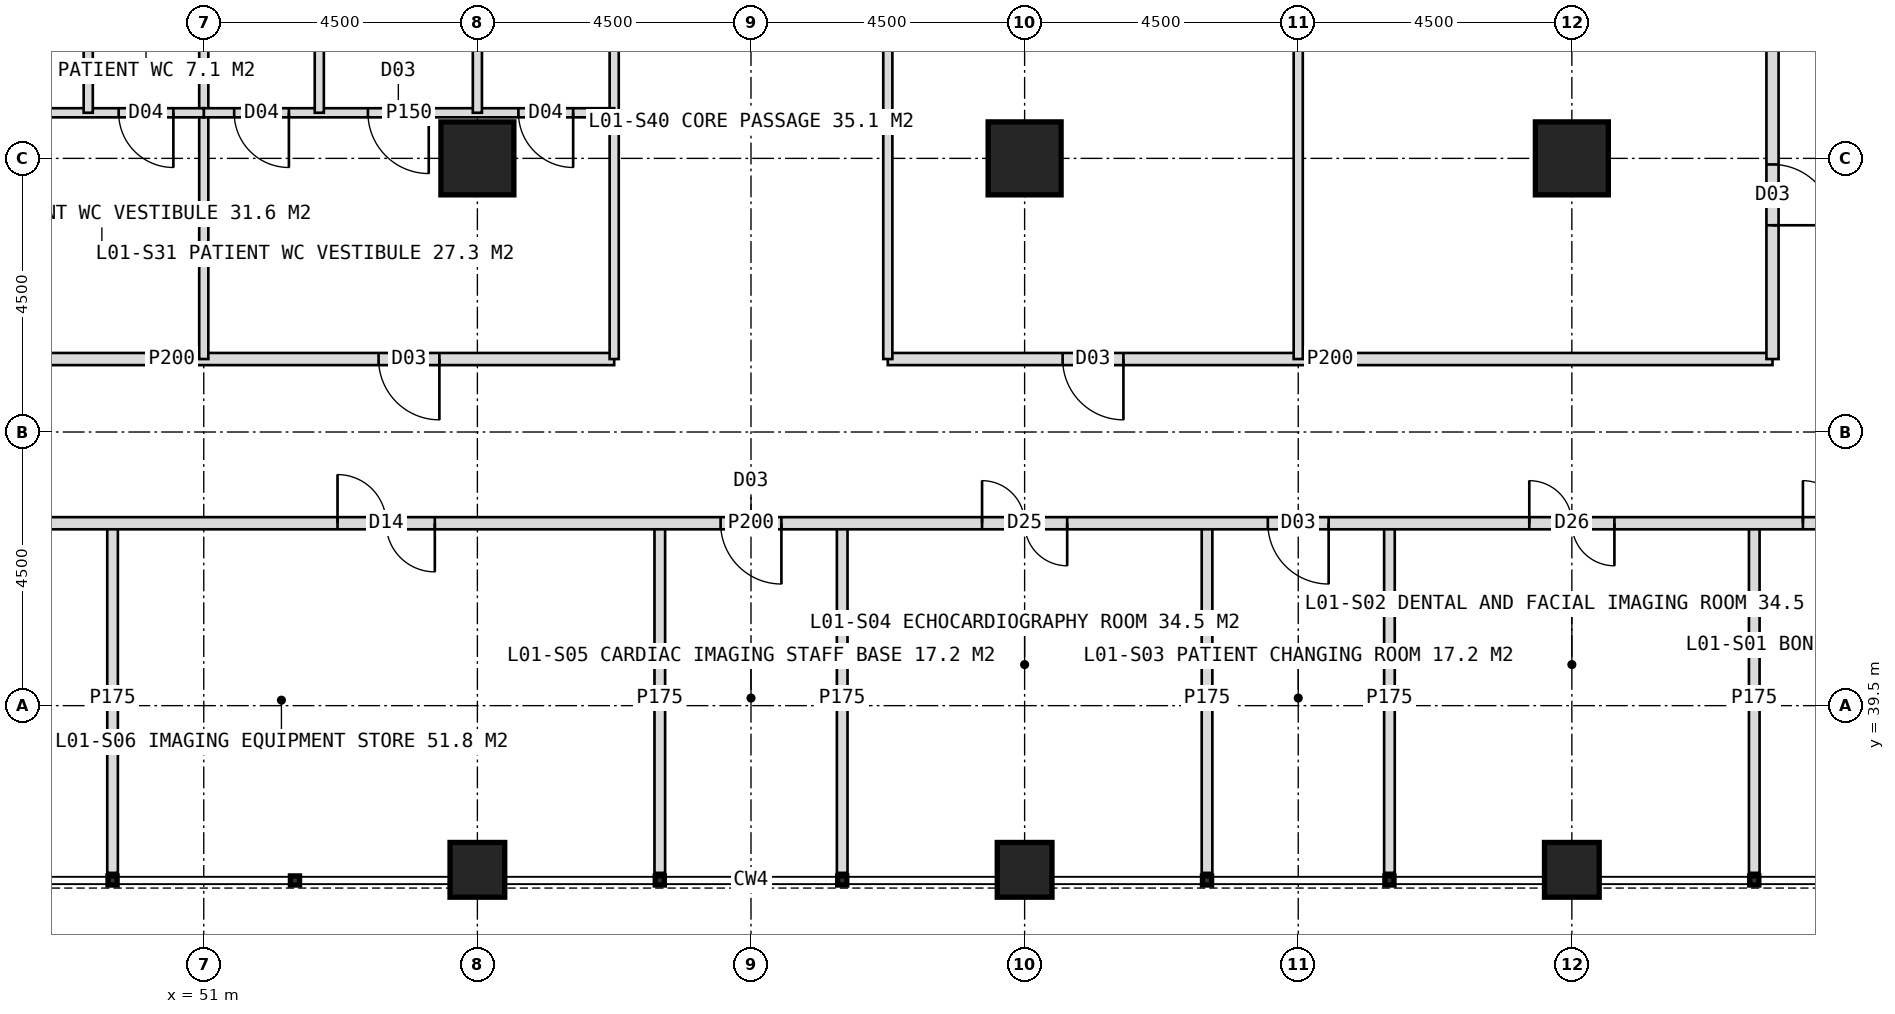
"""IFC4 building model, lengths in metres.
Left out: names, types, materials, properties, quantities, classifications, styles, units other than length and angle.
Written with IfcOpenShell. Run it as: python <this file> out.ifc"""

import sys

from ifc_helpers import new_model, si_unit, direction, frame, frame_2d, origin, origin_2d, place, context, subcontext, project, spatial, rectangle, hollow_rectangle, extrude, element, fill, save


model = new_model("IFC4")
c1 = context("Model", 3, precision=1e-05, world=origin(), true_north=direction((0.0, 1.0)))
c2 = subcontext(c1, "Body", "Model", "MODEL_VIEW")
j1 = project(units=[si_unit("LENGTHUNIT", "METRE"), si_unit("PLANEANGLEUNIT", "RADIAN")], contexts=[c1])
p1 = place(None, origin())
s1 = spatial("IfcSite", under=j1, at=p1, CompositionType="ELEMENT")
p2 = place(p1, origin())
s2 = spatial("IfcBuilding", under=s1, at=p2, CompositionType="ELEMENT")
p3 = place(p2, frame((0.0, 0.0, 6.0)))
s3 = spatial("IfcBuildingStorey", under=s2, at=p3, CompositionType="ELEMENT", Elevation=6.0)
for number, where, z_axis, x_axis in (
    (1, (73.5, 48.5, 0.0), (0.0, 0.0, 1.0), (1.0, 0.0, 0.0)),
    (2, (55.5, 48.5, 0.0), (0.0, 0.0, 1.0), (1.0, 0.0, 0.0)),
    (3, (64.5, 48.5, 0.0), (0.0, 0.0, 1.0), (1.0, 0.0, 0.0)),
):
    element("IfcColumn", number, at=place(p3, frame(where, z_axis=z_axis, x_axis=x_axis)), inside=s3, PredefinedType="COLUMN", context=c2, shape_type="SweptSolid", body=[
        extrude(hollow_rectangle(XDim=1.2, YDim=1.2, WallThickness=0.1, at=origin_2d()), origin(), (0.0, 0.0, 1.0), 5.0),
    ])
for number, where, z_axis, x_axis in (
    (4, (55.5, 36.8, 0.0), (0.0, 0.0, 1.0), (1.0, 0.0, 0.0)),
    (5, (64.5, 36.8, 0.0), (0.0, 0.0, 1.0), (1.0, 0.0, 0.0)),
    (6, (73.5, 36.8, 0.0), (0.0, 0.0, 1.0), (1.0, 0.0, 0.0)),
):
    element("IfcColumn", number, at=place(p3, frame(where, z_axis=z_axis, x_axis=x_axis)), inside=s3, PredefinedType="COLUMN", context=c2, shape_type="SweptSolid", body=[
        extrude(hollow_rectangle(XDim=0.9, YDim=0.9, WallThickness=0.08, at=origin_2d()), origin(), (0.0, 0.0, 1.0), 5.0),
    ])
for number, where, z_axis, x_axis in (
    (7, (76.5, 42.5, 0.0), (0.0, 0.0, 1.0), (0.0, -1.0, 0.0)),
    (8, (70.5, 42.5, 0.0), (0.0, 0.0, 1.0), (0.0, -1.0, 0.0)),
    (9, (67.5, 42.5, 0.0), (0.0, 0.0, 1.0), (0.0, -1.0, 0.0)),
    (10, (61.5, 42.5, 0.0), (0.0, 0.0, 1.0), (0.0, -1.0, 0.0)),
    (11, (58.5, 42.5, 0.0), (0.0, 0.0, 1.0), (0.0, -1.0, 0.0)),
    (12, (49.5, 42.5, 0.0), (0.0, 0.0, 1.0), (0.0, -1.0, 0.0)),
):
    element("IfcWall", number, at=place(p3, frame(where, z_axis=z_axis, x_axis=x_axis)), inside=s3, PredefinedType="PARTITIONING", context=c2, shape_type="SweptSolid", body=[
        extrude(rectangle(XDim=5.75, YDim=0.175, at=frame_2d((2.875, 0.0))), origin(), (0.0, 0.0, 1.0), 4.7),
    ])
p4 = place(p3, frame((79.5, 42.5, 0.0), z_axis=(0.0, 0.0, 1.0), x_axis=(-1.0, 0.0, 0.0)))
e13 = element("IfcWall", 13, at=p4, inside=s3, PredefinedType="PARTITIONING", context=c2, shape_type="SweptSolid", body=[
    extrude(rectangle(XDim=39.0, YDim=0.2, at=frame_2d((19.5, 0.0))), origin(), (0.0, 0.0, 1.0), 4.7),
])
p5 = place(p4, frame((0.8, 0.0, 0.0)))
e14 = element("IfcOpeningElement", 14, at=p5, cuts=e13, PredefinedType="OPENING", context=c2, shape_type="SweptSolid", body=[
    extrude(rectangle(XDim=1.4, YDim=2.2, at=frame_2d((0.7, 1.1))), frame((0.0, 0.11, 0.0), z_axis=(0.0, -1.0, 0.0), x_axis=(1.0, 0.0, 0.0)), (0.0, 0.0, 1.0), 0.22),
])
p6 = place(p4, frame((5.3, 0.0, 0.0)))
e15 = element("IfcOpeningElement", 15, at=p6, cuts=e13, PredefinedType="OPENING", context=c2, shape_type="SweptSolid", body=[
    extrude(rectangle(XDim=1.4, YDim=2.2, at=frame_2d((0.7, 1.1))), frame((0.0, 0.11, 0.0), z_axis=(0.0, -1.0, 0.0), x_axis=(1.0, 0.0, 0.0)), (0.0, 0.0, 1.0), 0.22),
])
p7 = place(p4, frame((10.0, 0.0, 0.0)))
e16 = element("IfcOpeningElement", 16, at=p7, cuts=e13, PredefinedType="OPENING", context=c2, shape_type="SweptSolid", body=[
    extrude(rectangle(XDim=1.0, YDim=2.1, at=frame_2d((0.5, 1.05))), frame((0.0, 0.11, 0.0), z_axis=(0.0, -1.0, 0.0), x_axis=(1.0, 0.0, 0.0)), (0.0, 0.0, 1.0), 0.22),
])
p8 = place(p4, frame((14.3, 0.0, 0.0)))
e17 = element("IfcOpeningElement", 17, at=p8, cuts=e13, PredefinedType="OPENING", context=c2, shape_type="SweptSolid", body=[
    extrude(rectangle(XDim=1.4, YDim=2.2, at=frame_2d((0.7, 1.1))), frame((0.0, 0.11, 0.0), z_axis=(0.0, -1.0, 0.0), x_axis=(1.0, 0.0, 0.0)), (0.0, 0.0, 1.0), 0.22),
])
p9 = place(p4, frame((19.0, 0.0, 0.0)))
e18 = element("IfcOpeningElement", 18, at=p9, cuts=e13, PredefinedType="OPENING", context=c2, shape_type="SweptSolid", body=[
    extrude(rectangle(XDim=1.0, YDim=2.1, at=frame_2d((0.5, 1.05))), frame((0.0, 0.11, 0.0), z_axis=(0.0, -1.0, 0.0), x_axis=(1.0, 0.0, 0.0)), (0.0, 0.0, 1.0), 0.22),
])
p10 = place(p4, frame((24.7, 0.0, 0.0)))
e19 = element("IfcOpeningElement", 19, at=p10, cuts=e13, PredefinedType="OPENING", context=c2, shape_type="SweptSolid", body=[
    extrude(rectangle(XDim=1.6, YDim=2.2, at=frame_2d((0.8, 1.1))), frame((0.0, 0.11, 0.0), z_axis=(0.0, -1.0, 0.0), x_axis=(1.0, 0.0, 0.0)), (0.0, 0.0, 1.0), 0.22),
])
p11 = place(p4, frame((33.7, 0.0, 0.0)))
e20 = element("IfcOpeningElement", 20, at=p11, cuts=e13, PredefinedType="OPENING", context=c2, shape_type="SweptSolid", body=[
    extrude(rectangle(XDim=1.6, YDim=2.2, at=frame_2d((0.8, 1.1))), frame((0.0, 0.11, 0.0), z_axis=(0.0, -1.0, 0.0), x_axis=(1.0, 0.0, 0.0)), (0.0, 0.0, 1.0), 0.22),
])
p12 = place(p3, frame((76.8, 45.2, 0.0), z_axis=(0.0, 0.0, 1.0), x_axis=(-1.0, 0.0, 0.0)))
e21 = element("IfcWall", 21, at=p12, inside=s3, PredefinedType="PARTITIONING", context=c2, shape_type="SweptSolid", body=[
    extrude(rectangle(XDim=14.55, YDim=0.2, at=frame_2d((7.275, 0.0))), origin(), (0.0, 0.0, 1.0), 4.7),
])
p13 = place(p12, frame((10.675, 0.0, 0.0)))
e22 = element("IfcOpeningElement", 22, at=p13, cuts=e21, PredefinedType="OPENING", context=c2, shape_type="SweptSolid", body=[
    extrude(rectangle(XDim=1.0, YDim=2.1, at=frame_2d((0.5, 1.05))), frame((0.0, 0.11, 0.0), z_axis=(0.0, -1.0, 0.0), x_axis=(1.0, 0.0, 0.0)), (0.0, 0.0, 1.0), 0.22),
])
p14 = place(p3, frame((57.75, 45.2, 0.0), z_axis=(0.0, 0.0, 1.0), x_axis=(-1.0, 0.0, 0.0)))
e23 = element("IfcWall", 23, at=p14, inside=s3, PredefinedType="PARTITIONING", context=c2, shape_type="SweptSolid", body=[
    extrude(rectangle(XDim=14.55, YDim=0.2, at=frame_2d((7.275, 0.0))), origin(), (0.0, 0.0, 1.0), 4.7),
])
p15 = place(p14, frame((2.875, 0.0, 0.0)))
e24 = element("IfcOpeningElement", 24, at=p15, cuts=e23, PredefinedType="OPENING", context=c2, shape_type="SweptSolid", body=[
    extrude(rectangle(XDim=1.0, YDim=2.1, at=frame_2d((0.5, 1.05))), frame((0.0, 0.11, 0.0), z_axis=(0.0, -1.0, 0.0), x_axis=(1.0, 0.0, 0.0)), (0.0, 0.0, 1.0), 0.22),
])
p16 = place(p14, frame((10.15, 0.0, 0.0)))
e25 = element("IfcOpeningElement", 25, at=p16, cuts=e23, PredefinedType="OPENING", context=c2, shape_type="SweptSolid", body=[
    extrude(rectangle(XDim=1.0, YDim=2.1, at=frame_2d((0.5, 1.05))), frame((0.0, 0.11, 0.0), z_axis=(0.0, -1.0, 0.0), x_axis=(1.0, 0.0, 0.0)), (0.0, 0.0, 1.0), 0.22),
])
for number, where, z_axis, x_axis in (
    (26, (69.0, 53.0, 0.0), (0.0, 0.0, 1.0), (0.0, -1.0, 0.0)),
    (27, (62.25, 53.0, 0.0), (0.0, 0.0, 1.0), (0.0, -1.0, 0.0)),
    (28, (57.75, 53.0, 0.0), (0.0, 0.0, 1.0), (0.0, -1.0, 0.0)),
    (29, (51.0, 53.0, 0.0), (0.0, 0.0, 1.0), (0.0, -1.0, 0.0)),
):
    element("IfcWall", number, at=place(p3, frame(where, z_axis=z_axis, x_axis=x_axis)), inside=s3, PredefinedType="PARTITIONING", context=c2, shape_type="SweptSolid", body=[
        extrude(rectangle(XDim=7.8, YDim=0.15, at=frame_2d((3.9, 0.0))), origin(), (0.0, 0.0, 1.0), 4.7),
    ])
p17 = place(p3, frame((57.75, 49.25, 0.0), z_axis=(0.0, 0.0, 1.0), x_axis=(-1.0, 0.0, 0.0)))
e30 = element("IfcWall", 30, at=p17, inside=s3, PredefinedType="PARTITIONING", context=c2, shape_type="SweptSolid", body=[
    extrude(rectangle(XDim=6.75, YDim=0.15, at=frame_2d((3.375, 0.0))), origin(), (0.0, 0.0, 1.0), 4.7),
])
p18 = place(p17, frame((0.675, 0.0, 0.0)))
e31 = element("IfcOpeningElement", 31, at=p18, cuts=e30, PredefinedType="OPENING", context=c2, shape_type="SweptSolid", body=[
    extrude(rectangle(XDim=0.9, YDim=2.1, at=frame_2d((0.45, 1.05))), frame((0.0, 0.085, 0.0), z_axis=(0.0, -1.0, 0.0), x_axis=(1.0, 0.0, 0.0)), (0.0, 0.0, 1.0), 0.17),
])
p19 = place(p17, frame((3.05, 0.0, 0.0)))
e32 = element("IfcOpeningElement", 32, at=p19, cuts=e30, PredefinedType="OPENING", context=c2, shape_type="SweptSolid", body=[
    extrude(rectangle(XDim=1.0, YDim=2.1, at=frame_2d((0.5, 1.05))), frame((0.0, 0.085, 0.0), z_axis=(0.0, -1.0, 0.0), x_axis=(1.0, 0.0, 0.0)), (0.0, 0.0, 1.0), 0.17),
])
p20 = place(p17, frame((5.35, 0.0, 0.0)))
e33 = element("IfcOpeningElement", 33, at=p20, cuts=e30, PredefinedType="OPENING", context=c2, shape_type="SweptSolid", body=[
    extrude(rectangle(XDim=0.9, YDim=2.1, at=frame_2d((0.45, 1.05))), frame((0.0, 0.085, 0.0), z_axis=(0.0, -1.0, 0.0), x_axis=(1.0, 0.0, 0.0)), (0.0, 0.0, 1.0), 0.17),
])
p21 = place(p3, frame((55.5, 53.0, 0.0), z_axis=(0.0, 0.0, 1.0), x_axis=(0.0, -1.0, 0.0)))
e34 = element("IfcWall", 34, at=p21, inside=s3, PredefinedType="PARTITIONING", context=c2, shape_type="SweptSolid", body=[
    extrude(rectangle(XDim=3.75, YDim=0.15, at=frame_2d((1.875, 0.0))), origin(), (0.0, 0.0, 1.0), 3.8),
])
p22 = place(p3, frame((52.9, 53.0, 0.0), z_axis=(0.0, 0.0, 1.0), x_axis=(0.0, -1.0, 0.0)))
e35 = element("IfcWall", 35, at=p22, inside=s3, PredefinedType="PARTITIONING", context=c2, shape_type="SweptSolid", body=[
    extrude(rectangle(XDim=3.75, YDim=0.15, at=frame_2d((1.875, 0.0))), origin(), (0.0, 0.0, 1.0), 4.7),
])
p23 = place(p3, frame((51.0, 49.25, 0.0), z_axis=(0.0, 0.0, 1.0), x_axis=(-1.0, 0.0, 0.0)))
e36 = element("IfcWall", 36, at=p23, inside=s3, PredefinedType="PARTITIONING", context=c2, shape_type="SweptSolid", body=[
    extrude(rectangle(XDim=7.8, YDim=0.15, at=frame_2d((3.9, 0.0))), origin(), (0.0, 0.0, 1.0), 4.7),
])
p24 = place(p23, frame((0.5, 0.0, 0.0)))
e37 = element("IfcOpeningElement", 37, at=p24, cuts=e36, PredefinedType="OPENING", context=c2, shape_type="SweptSolid", body=[
    extrude(rectangle(XDim=0.9, YDim=2.1, at=frame_2d((0.45, 1.05))), frame((0.0, 0.085, 0.0), z_axis=(0.0, -1.0, 0.0), x_axis=(1.0, 0.0, 0.0)), (0.0, 0.0, 1.0), 0.17),
])
p25 = place(p23, frame((2.7, 0.0, 0.0)))
e38 = element("IfcOpeningElement", 38, at=p25, cuts=e36, PredefinedType="OPENING", context=c2, shape_type="SweptSolid", body=[
    extrude(rectangle(XDim=1.0, YDim=2.1, at=frame_2d((0.5, 1.05))), frame((0.0, 0.085, 0.0), z_axis=(0.0, -1.0, 0.0), x_axis=(1.0, 0.0, 0.0)), (0.0, 0.0, 1.0), 0.17),
])
p26 = place(p23, frame((5.7, 0.0, 0.0)))
e39 = element("IfcOpeningElement", 39, at=p26, cuts=e36, PredefinedType="OPENING", context=c2, shape_type="SweptSolid", body=[
    extrude(rectangle(XDim=0.9, YDim=2.1, at=frame_2d((0.45, 1.05))), frame((0.0, 0.085, 0.0), z_axis=(0.0, -1.0, 0.0), x_axis=(1.0, 0.0, 0.0)), (0.0, 0.0, 1.0), 0.17),
])
p27 = place(p3, frame((49.1, 53.0, 0.0), z_axis=(0.0, 0.0, 1.0), x_axis=(0.0, -1.0, 0.0)))
e40 = element("IfcWall", 40, at=p27, inside=s3, PredefinedType="PARTITIONING", context=c2, shape_type="SweptSolid", body=[
    extrude(rectangle(XDim=3.75, YDim=0.15, at=frame_2d((1.875, 0.0))), origin(), (0.0, 0.0, 1.0), 4.7),
])
p28 = place(p3, frame((76.8, 62.0, 0.0), z_axis=(0.0, 0.0, 1.0), x_axis=(0.0, -1.0, 0.0)))
e41 = element("IfcWall", 41, at=p28, inside=s3, PredefinedType="PARTITIONING", context=c2, shape_type="SweptSolid", body=[
    extrude(rectangle(XDim=16.8, YDim=0.2, at=frame_2d((8.4, 0.0))), origin(), (0.0, 0.0, 1.0), 4.7),
])
p29 = place(p28, frame((4.0, 0.0, 0.0)))
e42 = element("IfcOpeningElement", 42, at=p29, cuts=e41, PredefinedType="OPENING", context=c2, shape_type="SweptSolid", body=[
    extrude(rectangle(XDim=1.0, YDim=2.1, at=frame_2d((0.5, 1.05))), frame((0.0, 0.11, 0.0), z_axis=(0.0, -1.0, 0.0), x_axis=(1.0, 0.0, 0.0)), (0.0, 0.0, 1.0), 0.22),
])
p30 = place(p28, frame((9.75, 0.0, 0.0)))
e43 = element("IfcOpeningElement", 43, at=p30, cuts=e41, PredefinedType="OPENING", context=c2, shape_type="SweptSolid", body=[
    extrude(rectangle(XDim=0.9, YDim=2.1, at=frame_2d((0.45, 1.05))), frame((0.0, 0.11, 0.0), z_axis=(0.0, -1.0, 0.0), x_axis=(1.0, 0.0, 0.0)), (0.0, 0.0, 1.0), 0.22),
])
p31 = place(p28, frame((13.6, 0.0, 0.0)))
e44 = element("IfcOpeningElement", 44, at=p31, cuts=e41, PredefinedType="OPENING", context=c2, shape_type="SweptSolid", body=[
    extrude(rectangle(XDim=1.0, YDim=2.1, at=frame_2d((0.5, 1.05))), frame((0.0, 0.11, 0.0), z_axis=(0.0, -1.0, 0.0), x_axis=(1.0, 0.0, 0.0)), (0.0, 0.0, 1.0), 0.22),
])
p32 = place(p13, origin())
e45 = element("IfcDoor", 45, at=p32, inside=s3, OperationType="SINGLE_SWING_LEFT", PredefinedType="DOOR", context=c2, shape_type="SweptSolid", body=[
    extrude(rectangle(XDim=1.0, YDim=2.1, at=frame_2d((0.5, 1.05))), frame((0.0, 0.025, 0.0), z_axis=(0.0, -1.0, 0.0), x_axis=(1.0, 0.0, 0.0)), (0.0, 0.0, 1.0), 0.05),
])
fill(e22, e45)
p33 = place(p15, origin())
e46 = element("IfcDoor", 46, at=p33, inside=s3, OperationType="SINGLE_SWING_LEFT", PredefinedType="DOOR", context=c2, shape_type="SweptSolid", body=[
    extrude(rectangle(XDim=1.0, YDim=2.1, at=frame_2d((0.5, 1.05))), frame((0.0, 0.025, 0.0), z_axis=(0.0, -1.0, 0.0), x_axis=(1.0, 0.0, 0.0)), (0.0, 0.0, 1.0), 0.05),
])
fill(e24, e46)
p34 = place(p5, origin())
e47 = element("IfcDoor", 47, at=p34, inside=s3, OperationType="DOUBLE_DOOR_SINGLE_SWING", PredefinedType="DOOR", context=c2, shape_type="SweptSolid", body=[
    extrude(rectangle(XDim=1.4, YDim=2.2, at=frame_2d((0.7, 1.1))), frame((0.0, 0.025, 0.0), z_axis=(0.0, -1.0, 0.0), x_axis=(1.0, 0.0, 0.0)), (0.0, 0.0, 1.0), 0.05),
])
fill(e14, e47)
p35 = place(p6, origin())
e48 = element("IfcDoor", 48, at=p35, inside=s3, OperationType="DOUBLE_DOOR_SINGLE_SWING", PredefinedType="DOOR", context=c2, shape_type="SweptSolid", body=[
    extrude(rectangle(XDim=1.4, YDim=2.2, at=frame_2d((0.7, 1.1))), frame((0.0, 0.025, 0.0), z_axis=(0.0, -1.0, 0.0), x_axis=(1.0, 0.0, 0.0)), (0.0, 0.0, 1.0), 0.05),
])
fill(e15, e48)
p36 = place(p7, origin())
e49 = element("IfcDoor", 49, at=p36, inside=s3, OperationType="SINGLE_SWING_LEFT", PredefinedType="DOOR", context=c2, shape_type="SweptSolid", body=[
    extrude(rectangle(XDim=1.0, YDim=2.1, at=frame_2d((0.5, 1.05))), frame((0.0, 0.025, 0.0), z_axis=(0.0, -1.0, 0.0), x_axis=(1.0, 0.0, 0.0)), (0.0, 0.0, 1.0), 0.05),
])
fill(e16, e49)
p37 = place(p8, origin())
e50 = element("IfcDoor", 50, at=p37, inside=s3, OperationType="DOUBLE_DOOR_SINGLE_SWING", PredefinedType="DOOR", context=c2, shape_type="SweptSolid", body=[
    extrude(rectangle(XDim=1.4, YDim=2.2, at=frame_2d((0.7, 1.1))), frame((0.0, 0.025, 0.0), z_axis=(0.0, -1.0, 0.0), x_axis=(1.0, 0.0, 0.0)), (0.0, 0.0, 1.0), 0.05),
])
fill(e17, e50)
p38 = place(p9, origin())
e51 = element("IfcDoor", 51, at=p38, inside=s3, OperationType="SINGLE_SWING_LEFT", PredefinedType="DOOR", context=c2, shape_type="SweptSolid", body=[
    extrude(rectangle(XDim=1.0, YDim=2.1, at=frame_2d((0.5, 1.05))), frame((0.0, 0.025, 0.0), z_axis=(0.0, -1.0, 0.0), x_axis=(1.0, 0.0, 0.0)), (0.0, 0.0, 1.0), 0.05),
])
fill(e18, e51)
p39 = place(p10, origin())
e52 = element("IfcDoor", 52, at=p39, inside=s3, OperationType="DOUBLE_DOOR_DOUBLE_SWING", PredefinedType="DOOR", context=c2, shape_type="SweptSolid", body=[
    extrude(rectangle(XDim=1.6, YDim=2.2, at=frame_2d((0.8, 1.1))), frame((0.0, 0.025, 0.0), z_axis=(0.0, -1.0, 0.0), x_axis=(1.0, 0.0, 0.0)), (0.0, 0.0, 1.0), 0.05),
])
fill(e19, e52)
p40 = place(p18, origin())
e53 = element("IfcDoor", 53, at=p40, inside=s3, OperationType="SINGLE_SWING_LEFT", PredefinedType="DOOR", context=c2, shape_type="SweptSolid", body=[
    extrude(rectangle(XDim=0.9, YDim=2.1, at=frame_2d((0.45, 1.05))), frame((0.0, 0.025, 0.0), z_axis=(0.0, -1.0, 0.0), x_axis=(1.0, 0.0, 0.0)), (0.0, 0.0, 1.0), 0.05),
])
fill(e31, e53)
p41 = place(p19, origin())
e54 = element("IfcDoor", 54, at=p41, inside=s3, OperationType="SINGLE_SWING_LEFT", PredefinedType="DOOR", context=c2, shape_type="SweptSolid", body=[
    extrude(rectangle(XDim=1.0, YDim=2.1, at=frame_2d((0.5, 1.05))), frame((0.0, 0.025, 0.0), z_axis=(0.0, -1.0, 0.0), x_axis=(1.0, 0.0, 0.0)), (0.0, 0.0, 1.0), 0.05),
])
fill(e32, e54)
p42 = place(p20, origin())
e55 = element("IfcDoor", 55, at=p42, inside=s3, OperationType="SINGLE_SWING_LEFT", PredefinedType="DOOR", context=c2, shape_type="SweptSolid", body=[
    extrude(rectangle(XDim=0.9, YDim=2.1, at=frame_2d((0.45, 1.05))), frame((0.0, 0.025, 0.0), z_axis=(0.0, -1.0, 0.0), x_axis=(1.0, 0.0, 0.0)), (0.0, 0.0, 1.0), 0.05),
])
fill(e33, e55)
p43 = place(p24, origin())
e56 = element("IfcDoor", 56, at=p43, inside=s3, OperationType="SINGLE_SWING_LEFT", PredefinedType="DOOR", context=c2, shape_type="SweptSolid", body=[
    extrude(rectangle(XDim=0.9, YDim=2.1, at=frame_2d((0.45, 1.05))), frame((0.0, 0.025, 0.0), z_axis=(0.0, -1.0, 0.0), x_axis=(1.0, 0.0, 0.0)), (0.0, 0.0, 1.0), 0.05),
])
fill(e37, e56)
p44 = place(p31, origin())
e57 = element("IfcDoor", 57, at=p44, inside=s3, OperationType="SINGLE_SWING_RIGHT", PredefinedType="DOOR", context=c2, shape_type="SweptSolid", body=[
    extrude(rectangle(XDim=1.0, YDim=2.1, at=frame_2d((0.5, 1.05))), frame((0.0, 0.025, 0.0), z_axis=(0.0, -1.0, 0.0), x_axis=(1.0, 0.0, 0.0)), (0.0, 0.0, 1.0), 0.05),
])
fill(e44, e57)
save(model, sys.argv[1])
